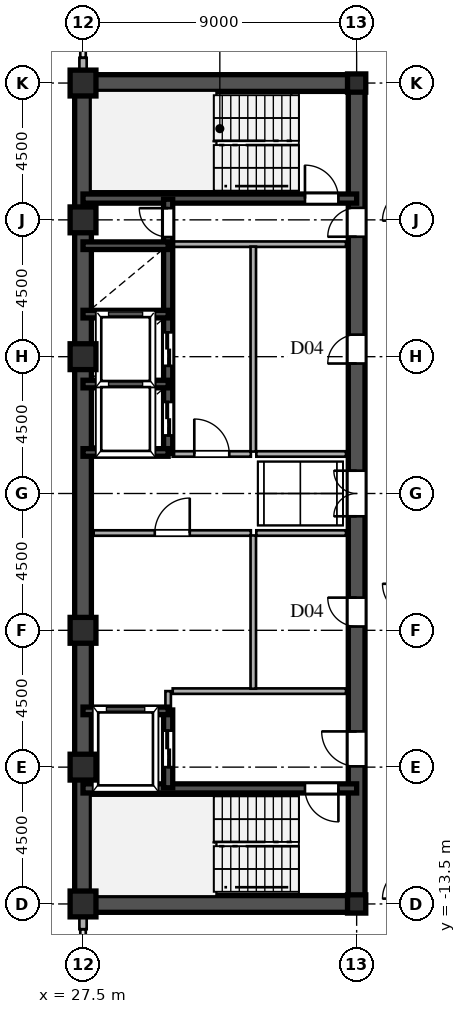
"""IFC4 building model, lengths in metres.
Left out: names, types, materials, properties, quantities, classifications, styles, units other than length and angle.
Written with IfcOpenShell. Run it as: python <this file> out.ifc"""

import sys

from ifc_helpers import new_model, si_unit, direction, frame, frame_2d, origin, origin_2d, place, context, subcontext, project, spatial, rectangle, hollow_rectangle, i_section, extrude, source, transform, mapped, element, fill, save


model = new_model("IFC4")
c1 = context("Model", 3, precision=1e-05, world=origin(), true_north=direction((0.0, 1.0)))
c2 = subcontext(c1, "Body", "Model", "MODEL_VIEW")
j1 = project(units=[si_unit("LENGTHUNIT", "METRE"), si_unit("PLANEANGLEUNIT", "RADIAN")], contexts=[c1])
p1 = place(None, origin())
s1 = spatial("IfcSite", under=j1, at=p1, CompositionType="ELEMENT")
p2 = place(p1, origin())
s2 = spatial("IfcBuilding", under=s1, at=p2, CompositionType="ELEMENT")
p3 = place(p2, frame((0.0, 0.0, 185.1)))
s3 = spatial("IfcBuildingStorey", under=s2, at=p3, CompositionType="ELEMENT", Elevation=185.1)
m1 = source(origin(), c2, "Body", "SweptSolid", [
    extrude(hollow_rectangle(XDim=0.85, YDim=0.85, WallThickness=0.036, at=origin_2d()), origin(), (0.0, 0.0, 1.0), 3.6),
])
for number, where, z_axis, x_axis in (
    (1, (27.5, -13.5, 0.0), (0.0, 0.0, 1.0), (1.0, 0.0, 0.0)),
    (2, (27.5, -9.0, 0.0), (0.0, 0.0, 1.0), (1.0, 0.0, 0.0)),
    (3, (27.5, -4.5, 0.0), (0.0, 0.0, 1.0), (1.0, 0.0, 0.0)),
    (4, (27.5, 4.5, 0.0), (0.0, 0.0, 1.0), (1.0, 0.0, 0.0)),
    (5, (27.5, 9.0, 0.0), (0.0, 0.0, 1.0), (1.0, 0.0, 0.0)),
    (6, (27.5, 13.5, 0.0), (0.0, 0.0, 1.0), (1.0, 0.0, 0.0)),
):
    element("IfcColumn", number, at=place(p3, frame(where, z_axis=z_axis, x_axis=x_axis)), inside=s3, PredefinedType="COLUMN", context=c2, shape_type="MappedRepresentation", body=[
        mapped(m1, transform((0.0, 0.0, 0.0), scale=1.0)),
    ])
m2 = source(origin(), c2, "Body", "SweptSolid", [
    extrude(i_section(OverallWidth=0.6, OverallDepth=0.6, WebThickness=0.025, FlangeThickness=0.04, at=origin_2d()), origin(), (0.0, 0.0, 1.0), 3.6),
])
for number, where, z_axis, x_axis in (
    (7, (36.5, -13.5, 0.0), (0.0, 0.0, 1.0), (1.0, 0.0, 0.0)),
    (8, (36.5, 13.5, 0.0), (0.0, 0.0, 1.0), (1.0, 0.0, 0.0)),
):
    element("IfcColumn", number, at=place(p3, frame(where, z_axis=z_axis, x_axis=x_axis)), inside=s3, PredefinedType="COLUMN", context=c2, shape_type="MappedRepresentation", body=[
        mapped(m2, transform((0.0, 0.0, 0.0), scale=1.0)),
    ])
for number, where, z_axis, x_axis in (
    (9, (27.5, -14.33, 0.0), (0.0, 0.0, 1.0), (0.0, 1.0, 0.0)),
    (10, (27.5, 13.78, 0.0), (0.0, 0.0, 1.0), (0.0, 1.0, 0.0)),
):
    element("IfcWall", number, at=place(p3, frame(where, z_axis=z_axis, x_axis=x_axis)), inside=s3, PredefinedType="SOLIDWALL", context=c2, shape_type="SweptSolid", body=[
        extrude(rectangle(XDim=0.55, YDim=0.24, at=frame_2d((0.275, 0.0))), origin(), (0.0, 0.0, 1.0), 2.88),
    ])
for number, where, z_axis, x_axis in (
    (11, (27.5, -13.5, 0.0), (0.0, 0.0, 1.0), (0.0, 1.0, 0.0)),
    (12, (27.5, 1.3, 0.0), (0.0, 0.0, 1.0), (0.0, 1.0, 0.0)),
):
    element("IfcWall", number, at=place(p3, frame(where, z_axis=z_axis, x_axis=x_axis)), inside=s3, PredefinedType="SHEAR", context=c2, shape_type="SweptSolid", body=[
        extrude(rectangle(XDim=12.2, YDim=0.55, at=frame_2d((6.1, 0.0))), origin(), (0.0, 0.0, 1.0), 3.38),
    ])
p4 = place(p3, frame((27.5, -1.3, 0.0), z_axis=(0.0, 0.0, 1.0), x_axis=(0.0, 1.0, 0.0)))
e13 = element("IfcWall", 13, at=p4, inside=s3, PredefinedType="SHEAR", context=c2, shape_type="SweptSolid", body=[
    extrude(rectangle(XDim=2.6, YDim=0.55, at=frame_2d((1.3, 0.0))), origin(), (0.0, 0.0, 1.0), 3.38),
])
for number, where, z_axis, x_axis in (
    (14, (27.5, -13.5, 0.0), (0.0, 0.0, 1.0), (1.0, 0.0, 0.0)),
    (15, (27.5, 13.5, 0.0), (0.0, 0.0, 1.0), (1.0, 0.0, 0.0)),
):
    element("IfcWall", number, at=place(p3, frame(where, z_axis=z_axis, x_axis=x_axis)), inside=s3, PredefinedType="SHEAR", context=c2, shape_type="SweptSolid", body=[
        extrude(rectangle(XDim=9.0, YDim=0.55, at=frame_2d((4.5, 0.0))), origin(), (0.0, 0.0, 1.0), 3.38),
    ])
p5 = place(p3, frame((36.5, -13.65, 0.0), z_axis=(0.0, 0.0, 1.0), x_axis=(0.0, 1.0, 0.0)))
e16 = element("IfcWall", 16, at=p5, inside=s3, PredefinedType="SHEAR", context=c2, shape_type="SweptSolid", body=[
    extrude(rectangle(XDim=7.15, YDim=0.55, at=frame_2d((3.575, 0.0))), origin(), (0.0, 0.0, 1.0), 3.38),
])
p6 = place(p5, frame((4.675, 0.0, 0.0)))
e17 = element("IfcOpeningElement", 17, at=p6, cuts=e16, PredefinedType="OPENING", context=c2, shape_type="SweptSolid", body=[
    extrude(rectangle(XDim=1.15, YDim=2.2, at=frame_2d((0.575, 1.1))), frame((0.0, 0.285, 0.0), z_axis=(0.0, -1.0, 0.0), x_axis=(1.0, 0.0, 0.0)), (0.0, 0.0, 1.0), 0.57),
])
p7 = place(p3, frame((36.5, -1.3, 0.0), z_axis=(0.0, 0.0, 1.0), x_axis=(0.0, 1.0, 0.0)))
e18 = element("IfcWall", 18, at=p7, inside=s3, PredefinedType="SHEAR", context=c2, shape_type="SweptSolid", body=[
    extrude(rectangle(XDim=2.6, YDim=0.55, at=frame_2d((1.3, 0.0))), origin(), (0.0, 0.0, 1.0), 3.38),
])
p8 = place(p7, frame((0.55, 0.0, 0.0)))
e19 = element("IfcOpeningElement", 19, at=p8, cuts=e18, PredefinedType="OPENING", context=c2, shape_type="SweptSolid", body=[
    extrude(rectangle(XDim=1.5, YDim=2.3, at=frame_2d((0.75, 1.15))), frame((0.0, 0.285, 0.0), z_axis=(0.0, -1.0, 0.0), x_axis=(1.0, 0.0, 0.0)), (0.0, 0.0, 1.0), 0.57),
])
p9 = place(p3, frame((36.5, 8.2, 0.0), z_axis=(0.0, 0.0, 1.0), x_axis=(0.0, 1.0, 0.0)))
e20 = element("IfcWall", 20, at=p9, inside=s3, PredefinedType="SHEAR", context=c2, shape_type="SweptSolid", body=[
    extrude(rectangle(XDim=5.45, YDim=0.55, at=frame_2d((2.725, 0.0))), origin(), (0.0, 0.0, 1.0), 3.38),
])
p10 = place(p9, frame((0.245, 0.0, 0.0)))
e21 = element("IfcOpeningElement", 21, at=p10, cuts=e20, PredefinedType="OPENING", context=c2, shape_type="SweptSolid", body=[
    extrude(rectangle(XDim=0.95, YDim=2.15, at=frame_2d((0.475, 1.075))), frame((0.0, 0.285, 0.0), z_axis=(0.0, -1.0, 0.0), x_axis=(1.0, 0.0, 0.0)), (0.0, 0.0, 1.0), 0.57),
])
p11 = place(p3, frame((36.5, -6.5, 0.0), z_axis=(0.0, 0.0, 1.0), x_axis=(0.0, 1.0, 0.0)))
e22 = element("IfcWall", 22, at=p11, inside=s3, PredefinedType="SHEAR", context=c2, shape_type="SweptSolid", body=[
    extrude(rectangle(XDim=5.2, YDim=0.55, at=frame_2d((2.6, 0.0))), origin(), (0.0, 0.0, 1.0), 3.38),
])
p12 = place(p11, frame((2.125, 0.0, 0.0)))
e23 = element("IfcOpeningElement", 23, at=p12, cuts=e22, PredefinedType="OPENING", context=c2, shape_type="SweptSolid", body=[
    extrude(rectangle(XDim=0.95, YDim=2.15, at=frame_2d((0.475, 1.075))), frame((0.0, 0.285, 0.0), z_axis=(0.0, -1.0, 0.0), x_axis=(1.0, 0.0, 0.0)), (0.0, 0.0, 1.0), 0.57),
])
p13 = place(p3, frame((36.5, 1.3, 0.0), z_axis=(0.0, 0.0, 1.0), x_axis=(0.0, 1.0, 0.0)))
e24 = element("IfcWall", 24, at=p13, inside=s3, PredefinedType="SHEAR", context=c2, shape_type="SweptSolid", body=[
    extrude(rectangle(XDim=6.9, YDim=0.55, at=frame_2d((3.45, 0.0))), origin(), (0.0, 0.0, 1.0), 3.38),
])
p14 = place(p13, frame((2.975, 0.0, 0.0)))
e25 = element("IfcOpeningElement", 25, at=p14, cuts=e24, PredefinedType="OPENING", context=c2, shape_type="SweptSolid", body=[
    extrude(rectangle(XDim=0.95, YDim=2.15, at=frame_2d((0.475, 1.075))), frame((0.0, 0.285, 0.0), z_axis=(0.0, -1.0, 0.0), x_axis=(1.0, 0.0, 0.0)), (0.0, 0.0, 1.0), 0.57),
])
p15 = place(p3, frame((27.5, -9.7, 0.0), z_axis=(0.0, 0.0, 1.0), x_axis=(1.0, 0.0, 0.0)))
e26 = element("IfcWall", 26, at=p15, inside=s3, PredefinedType="SHEAR", context=c2, shape_type="SweptSolid", body=[
    extrude(rectangle(XDim=9.0, YDim=0.3, at=frame_2d((4.5, 0.0))), origin(), (0.0, 0.0, 1.0), 3.38),
])
p16 = place(p15, frame((7.3, 0.0, 0.0)))
e27 = element("IfcOpeningElement", 27, at=p16, cuts=e26, PredefinedType="OPENING", context=c2, shape_type="SweptSolid", body=[
    extrude(rectangle(XDim=1.1, YDim=2.2, at=frame_2d((0.55, 1.1))), frame((0.0, 0.16, 0.0), z_axis=(0.0, -1.0, 0.0), x_axis=(1.0, 0.0, 0.0)), (0.0, 0.0, 1.0), 0.32),
])
p17 = place(p3, frame((27.5, 9.7, 0.0), z_axis=(0.0, 0.0, 1.0), x_axis=(1.0, 0.0, 0.0)))
e28 = element("IfcWall", 28, at=p17, inside=s3, PredefinedType="SHEAR", context=c2, shape_type="SweptSolid", body=[
    extrude(rectangle(XDim=9.0, YDim=0.3, at=frame_2d((4.5, 0.0))), origin(), (0.0, 0.0, 1.0), 3.38),
])
p18 = place(p17, frame((7.3, 0.0, 0.0)))
e29 = element("IfcOpeningElement", 29, at=p18, cuts=e28, PredefinedType="OPENING", context=c2, shape_type="SweptSolid", body=[
    extrude(rectangle(XDim=1.1, YDim=2.2, at=frame_2d((0.55, 1.1))), frame((0.0, 0.16, 0.0), z_axis=(0.0, -1.0, 0.0), x_axis=(1.0, 0.0, 0.0)), (0.0, 0.0, 1.0), 0.32),
])
for number, where, z_axis, x_axis in (
    (30, (27.5, -7.15, 0.0), (0.0, 0.0, 1.0), (1.0, 0.0, 0.0)),
    (31, (27.5, 1.35, 0.0), (0.0, 0.0, 1.0), (1.0, 0.0, 0.0)),
    (32, (27.5, 3.6, 0.0), (0.0, 0.0, 1.0), (1.0, 0.0, 0.0)),
    (33, (27.5, 5.9, 0.0), (0.0, 0.0, 1.0), (1.0, 0.0, 0.0)),
    (34, (27.5, 8.15, 0.0), (0.0, 0.0, 1.0), (1.0, 0.0, 0.0)),
):
    element("IfcWall", number, at=place(p3, frame(where, z_axis=z_axis, x_axis=x_axis)), inside=s3, PredefinedType="SHEAR", context=c2, shape_type="SweptSolid", body=[
        extrude(rectangle(XDim=2.8, YDim=0.25, at=frame_2d((1.4, 0.0))), origin(), (0.0, 0.0, 1.0), 3.38),
    ])
p19 = place(p3, frame((30.3, -9.68, 0.0), z_axis=(0.0, 0.0, 1.0), x_axis=(0.0, 1.0, 0.0)))
e35 = element("IfcWall", 35, at=p19, inside=s3, PredefinedType="SHEAR", context=c2, shape_type="SweptSolid", body=[
    extrude(rectangle(XDim=2.56, YDim=0.3, at=frame_2d((1.28, 0.0))), origin(), (0.0, 0.0, 1.0), 3.38),
])
p20 = place(p19, frame((0.68, 0.0, 0.0)))
e36 = element("IfcOpeningElement", 36, at=p20, cuts=e35, PredefinedType="OPENING", context=c2, shape_type="SweptSolid", body=[
    extrude(rectangle(XDim=1.2, YDim=2.25, at=frame_2d((0.6, 1.125))), frame((0.0, 0.16, 0.0), z_axis=(0.0, -1.0, 0.0), x_axis=(1.0, 0.0, 0.0)), (0.0, 0.0, 1.0), 0.32),
])
p21 = place(p3, frame((30.3, 1.32, 0.0), z_axis=(0.0, 0.0, 1.0), x_axis=(0.0, 1.0, 0.0)))
e37 = element("IfcWall", 37, at=p21, inside=s3, PredefinedType="SHEAR", context=c2, shape_type="SweptSolid", body=[
    extrude(rectangle(XDim=2.28, YDim=0.3, at=frame_2d((1.14, 0.0))), origin(), (0.0, 0.0, 1.0), 3.38),
])
p22 = place(p21, frame((0.59, 0.0, 0.0)))
e38 = element("IfcOpeningElement", 38, at=p22, cuts=e37, PredefinedType="OPENING", context=c2, shape_type="SweptSolid", body=[
    extrude(rectangle(XDim=1.1, YDim=2.2, at=frame_2d((0.55, 1.1))), frame((0.0, 0.16, 0.0), z_axis=(0.0, -1.0, 0.0), x_axis=(1.0, 0.0, 0.0)), (0.0, 0.0, 1.0), 0.32),
])
p23 = place(p3, frame((30.3, 3.6, 0.0), z_axis=(0.0, 0.0, 1.0), x_axis=(0.0, 1.0, 0.0)))
e39 = element("IfcWall", 39, at=p23, inside=s3, PredefinedType="SHEAR", context=c2, shape_type="SweptSolid", body=[
    extrude(rectangle(XDim=2.3, YDim=0.3, at=frame_2d((1.15, 0.0))), origin(), (0.0, 0.0, 1.0), 3.38),
])
p24 = place(p23, frame((0.6, 0.0, 0.0)))
e40 = element("IfcOpeningElement", 40, at=p24, cuts=e39, PredefinedType="OPENING", context=c2, shape_type="SweptSolid", body=[
    extrude(rectangle(XDim=1.1, YDim=2.2, at=frame_2d((0.55, 1.1))), frame((0.0, 0.16, 0.0), z_axis=(0.0, -1.0, 0.0), x_axis=(1.0, 0.0, 0.0)), (0.0, 0.0, 1.0), 0.32),
])
p25 = place(p3, frame((30.3, 5.9, 0.0), z_axis=(0.0, 0.0, 1.0), x_axis=(0.0, 1.0, 0.0)))
e41 = element("IfcWall", 41, at=p25, inside=s3, PredefinedType="SHEAR", context=c2, shape_type="SweptSolid", body=[
    extrude(rectangle(XDim=2.25, YDim=0.3, at=frame_2d((1.125, 0.0))), origin(), (0.0, 0.0, 1.0), 3.38),
])
p26 = place(p3, frame((30.3, 8.15, 0.0), z_axis=(0.0, 0.0, 1.0), x_axis=(0.0, 1.0, 0.0)))
e42 = element("IfcWall", 42, at=p26, inside=s3, PredefinedType="SHEAR", context=c2, shape_type="SweptSolid", body=[
    extrude(rectangle(XDim=1.53, YDim=0.3, at=frame_2d((0.765, 0.0))), origin(), (0.0, 0.0, 1.0), 3.38),
])
p27 = place(p26, frame((0.285, 0.0, 0.0)))
e43 = element("IfcOpeningElement", 43, at=p27, cuts=e42, PredefinedType="OPENING", context=c2, shape_type="SweptSolid", body=[
    extrude(rectangle(XDim=0.95, YDim=2.15, at=frame_2d((0.475, 1.075))), frame((0.0, 0.16, 0.0), z_axis=(0.0, -1.0, 0.0), x_axis=(1.0, 0.0, 0.0)), (0.0, 0.0, 1.0), 0.32),
])
p28 = place(p3, frame((30.45, -6.5, 0.0), z_axis=(0.0, 0.0, 1.0), x_axis=(1.0, 0.0, 0.0)))
e44 = element("IfcWall", 44, at=p28, inside=s3, PredefinedType="PARTITIONING", context=c2, shape_type="SweptSolid", body=[
    extrude(rectangle(XDim=5.7, YDim=0.18, at=frame_2d((2.85, 0.0))), origin(), (0.0, 0.0, 1.0), 3.38),
])
p29 = place(p3, frame((30.3, -7.12, 0.0), z_axis=(0.0, 0.0, 1.0), x_axis=(0.0, 1.0, 0.0)))
e45 = element("IfcWall", 45, at=p29, inside=s3, PredefinedType="PARTITIONING", context=c2, shape_type="SweptSolid", body=[
    extrude(rectangle(XDim=0.62, YDim=0.18, at=frame_2d((0.31, 0.0))), origin(), (0.0, 0.0, 1.0), 3.38),
])
p30 = place(p3, frame((30.45, 8.2, 0.0), z_axis=(0.0, 0.0, 1.0), x_axis=(1.0, 0.0, 0.0)))
e46 = element("IfcWall", 46, at=p30, inside=s3, PredefinedType="PARTITIONING", context=c2, shape_type="SweptSolid", body=[
    extrude(rectangle(XDim=5.7, YDim=0.18, at=frame_2d((2.85, 0.0))), origin(), (0.0, 0.0, 1.0), 3.38),
])
p31 = place(p3, frame((33.1, -6.42, 0.0), z_axis=(0.0, 0.0, 1.0), x_axis=(0.0, 1.0, 0.0)))
e47 = element("IfcWall", 47, at=p31, inside=s3, PredefinedType="PARTITIONING", context=c2, shape_type="SweptSolid", body=[
    extrude(rectangle(XDim=5.04, YDim=0.18, at=frame_2d((2.52, 0.0))), origin(), (0.0, 0.0, 1.0), 3.38),
])
p32 = place(p3, frame((33.1, 1.38, 0.0), z_axis=(0.0, 0.0, 1.0), x_axis=(0.0, 1.0, 0.0)))
e48 = element("IfcWall", 48, at=p32, inside=s3, PredefinedType="PARTITIONING", context=c2, shape_type="SweptSolid", body=[
    extrude(rectangle(XDim=6.74, YDim=0.18, at=frame_2d((3.37, 0.0))), origin(), (0.0, 0.0, 1.0), 3.38),
])
p33 = place(p3, frame((27.85, -1.3, 0.0), z_axis=(0.0, 0.0, 1.0), x_axis=(1.0, 0.0, 0.0)))
e49 = element("IfcWall", 49, at=p33, inside=s3, PredefinedType="PARTITIONING", context=c2, shape_type="SweptSolid", body=[
    extrude(rectangle(XDim=5.17, YDim=0.18, at=frame_2d((2.585, 0.0))), origin(), (0.0, 0.0, 1.0), 3.38),
])
p34 = place(p33, frame((2.01, 0.0, 0.0)))
e50 = element("IfcOpeningElement", 50, at=p34, cuts=e49, PredefinedType="OPENING", context=c2, shape_type="SweptSolid", body=[
    extrude(rectangle(XDim=1.15, YDim=2.2, at=frame_2d((0.575, 1.1))), frame((0.0, 0.1, 0.0), z_axis=(0.0, -1.0, 0.0), x_axis=(1.0, 0.0, 0.0)), (0.0, 0.0, 1.0), 0.2),
])
p35 = place(p3, frame((30.45, 1.3, 0.0), z_axis=(0.0, 0.0, 1.0), x_axis=(1.0, 0.0, 0.0)))
e51 = element("IfcWall", 51, at=p35, inside=s3, PredefinedType="PARTITIONING", context=c2, shape_type="SweptSolid", body=[
    extrude(rectangle(XDim=2.57, YDim=0.18, at=frame_2d((1.285, 0.0))), origin(), (0.0, 0.0, 1.0), 3.38),
])
p36 = place(p35, frame((0.71, 0.0, 0.0)))
e52 = element("IfcOpeningElement", 52, at=p36, cuts=e51, PredefinedType="OPENING", context=c2, shape_type="SweptSolid", body=[
    extrude(rectangle(XDim=1.15, YDim=2.2, at=frame_2d((0.575, 1.1))), frame((0.0, 0.1, 0.0), z_axis=(0.0, -1.0, 0.0), x_axis=(1.0, 0.0, 0.0)), (0.0, 0.0, 1.0), 0.2),
])
for number, where, z_axis, x_axis in (
    (53, (33.2, -1.3, 0.0), (0.0, 0.0, 1.0), (1.0, 0.0, 0.0)),
    (54, (33.2, 1.3, 0.0), (0.0, 0.0, 1.0), (1.0, 0.0, 0.0)),
):
    element("IfcWall", number, at=place(p3, frame(where, z_axis=z_axis, x_axis=x_axis)), inside=s3, PredefinedType="PARTITIONING", context=c2, shape_type="SweptSolid", body=[
        extrude(rectangle(XDim=2.95, YDim=0.18, at=frame_2d((1.475, 0.0))), origin(), (0.0, 0.0, 1.0), 3.38),
    ])
m3 = source(origin(), c2, "Body", "SweptSolid", [
    extrude(rectangle(XDim=1.15, YDim=2.2, at=frame_2d((0.575, 1.1))), frame((0.0, 0.025, 0.0), z_axis=(0.0, -1.0, 0.0), x_axis=(1.0, 0.0, 0.0)), (0.0, 0.0, 1.0), 0.05),
])
p37 = place(p6, origin())
e55 = element("IfcDoor", 55, at=p37, inside=s3, OperationType="SINGLE_SWING_RIGHT", PredefinedType="DOOR", context=c2, shape_type="MappedRepresentation", body=[
    mapped(m3, transform((0.0, 0.0, 0.0), scale=1.0)),
])
fill(e17, e55)
m4 = source(origin(), c2, "Body", "SweptSolid", [
    extrude(rectangle(XDim=1.5, YDim=2.3, at=frame_2d((0.75, 1.15))), frame((0.0, 0.025, 0.0), z_axis=(0.0, -1.0, 0.0), x_axis=(1.0, 0.0, 0.0)), (0.0, 0.0, 1.0), 0.05),
])
p38 = place(p8, origin())
e56 = element("IfcDoor", 56, at=p38, inside=s3, OperationType="DOUBLE_SWING_LEFT", PredefinedType="DOOR", context=c2, shape_type="MappedRepresentation", body=[
    mapped(m4, transform((0.0, 0.0, 0.0), scale=1.0)),
])
fill(e19, e56)
m5 = source(origin(), c2, "Body", "SweptSolid", [
    extrude(rectangle(XDim=0.95, YDim=2.15, at=frame_2d((0.475, 1.075))), frame((0.0, 0.025, 0.0), z_axis=(0.0, -1.0, 0.0), x_axis=(1.0, 0.0, 0.0)), (0.0, 0.0, 1.0), 0.05),
])
p39 = place(p10, origin())
e57 = element("IfcDoor", 57, at=p39, inside=s3, OperationType="SINGLE_SWING_LEFT", PredefinedType="DOOR", context=c2, shape_type="MappedRepresentation", body=[
    mapped(m5, transform((0.0, 0.0, 0.0), scale=1.0)),
])
fill(e21, e57)
p40 = place(p12, origin())
e58 = element("IfcDoor", 58, at=p40, inside=s3, OperationType="SINGLE_SWING_RIGHT", PredefinedType="DOOR", context=c2, shape_type="MappedRepresentation", body=[
    mapped(m5, transform((0.0, 0.0, 0.0), scale=1.0)),
])
fill(e23, e58)
p41 = place(p14, origin())
e59 = element("IfcDoor", 59, at=p41, inside=s3, OperationType="SINGLE_SWING_LEFT", PredefinedType="DOOR", context=c2, shape_type="MappedRepresentation", body=[
    mapped(m5, transform((0.0, 0.0, 0.0), scale=1.0)),
])
fill(e25, e59)
m6 = source(origin(), c2, "Body", "SweptSolid", [
    extrude(rectangle(XDim=1.1, YDim=2.2, at=frame_2d((0.55, 1.1))), frame((0.0, 0.025, 0.0), z_axis=(0.0, -1.0, 0.0), x_axis=(1.0, 0.0, 0.0)), (0.0, 0.0, 1.0), 0.05),
])
p42 = place(p16, frame((1.1, 0.0, 0.0), z_axis=(0.0, 0.0, 1.0), x_axis=(-1.0, 0.0, 0.0)))
e60 = element("IfcDoor", 60, at=p42, inside=s3, OperationType="SINGLE_SWING_RIGHT", PredefinedType="DOOR", context=c2, shape_type="MappedRepresentation", body=[
    mapped(m6, transform((0.0, 0.0, 0.0), scale=1.0)),
])
fill(e27, e60)
p43 = place(p18, origin())
e61 = element("IfcDoor", 61, at=p43, inside=s3, OperationType="SINGLE_SWING_LEFT", PredefinedType="DOOR", context=c2, shape_type="MappedRepresentation", body=[
    mapped(m6, transform((0.0, 0.0, 0.0), scale=1.0)),
])
fill(e29, e61)
m7 = source(origin(), c2, "Body", "SweptSolid", [
    extrude(rectangle(XDim=1.2, YDim=2.25, at=frame_2d((0.6, 1.125))), frame((0.0, 0.025, 0.0), z_axis=(0.0, -1.0, 0.0), x_axis=(1.0, 0.0, 0.0)), (0.0, 0.0, 1.0), 0.05),
])
p44 = place(p20, origin())
e62 = element("IfcDoor", 62, at=p44, inside=s3, OperationType="DOUBLE_DOOR_SLIDING", PredefinedType="DOOR", context=c2, shape_type="MappedRepresentation", body=[
    mapped(m7, transform((0.0, 0.0, 0.0), scale=1.0)),
])
fill(e36, e62)
m8 = source(origin(), c2, "Body", "SweptSolid", [
    extrude(rectangle(XDim=1.1, YDim=2.2, at=frame_2d((0.55, 1.1))), frame((0.0, 0.025, 0.0), z_axis=(0.0, -1.0, 0.0), x_axis=(1.0, 0.0, 0.0)), (0.0, 0.0, 1.0), 0.05),
])
p45 = place(p22, origin())
e63 = element("IfcDoor", 63, at=p45, inside=s3, OperationType="DOUBLE_DOOR_SLIDING", PredefinedType="DOOR", context=c2, shape_type="MappedRepresentation", body=[
    mapped(m8, transform((0.0, 0.0, 0.0), scale=1.0)),
])
fill(e38, e63)
p46 = place(p24, origin())
e64 = element("IfcDoor", 64, at=p46, inside=s3, OperationType="DOUBLE_DOOR_SLIDING", PredefinedType="DOOR", context=c2, shape_type="MappedRepresentation", body=[
    mapped(m8, transform((0.0, 0.0, 0.0), scale=1.0)),
])
fill(e40, e64)
p47 = place(p27, origin())
e65 = element("IfcDoor", 65, at=p47, inside=s3, OperationType="SINGLE_SWING_RIGHT", PredefinedType="DOOR", context=c2, shape_type="MappedRepresentation", body=[
    mapped(m5, transform((0.0, 0.0, 0.0), scale=1.0)),
])
fill(e43, e65)
p48 = place(p34, origin())
e66 = element("IfcDoor", 66, at=p48, inside=s3, OperationType="SINGLE_SWING_RIGHT", PredefinedType="DOOR", context=c2, shape_type="MappedRepresentation", body=[
    mapped(m3, transform((0.0, 0.0, 0.0), scale=1.0)),
])
fill(e50, e66)
p49 = place(p36, origin())
e67 = element("IfcDoor", 67, at=p49, inside=s3, OperationType="SINGLE_SWING_LEFT", PredefinedType="DOOR", context=c2, shape_type="MappedRepresentation", body=[
    mapped(m3, transform((0.0, 0.0, 0.0), scale=1.0)),
])
fill(e52, e67)
save(model, sys.argv[1])
